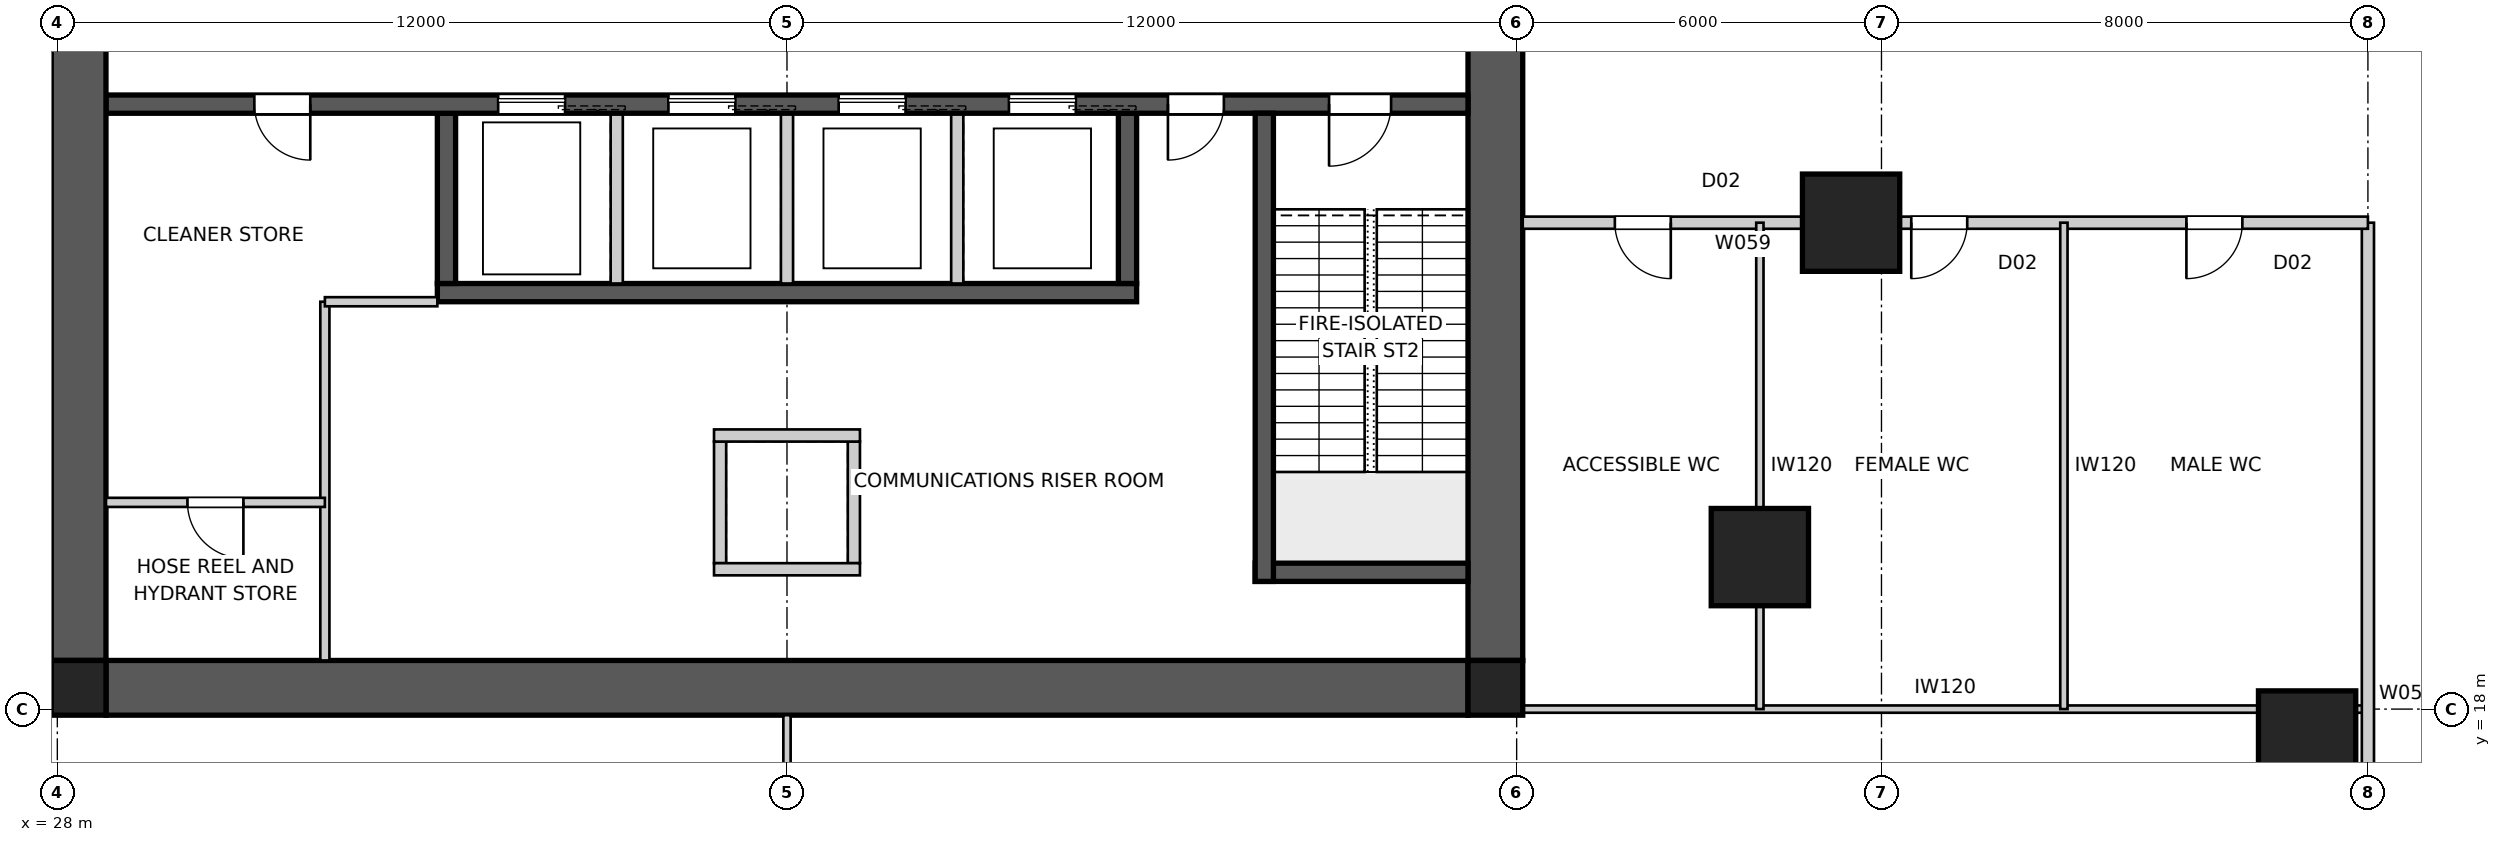
"""IFC4 building model, lengths in metres.
Left out: names, types, materials, properties, quantities, classifications, styles, units other than length and angle.
Written with IfcOpenShell. Run it as: python <this file> out.ifc"""

import sys

from ifc_helpers import new_model, si_unit, direction, frame, frame_2d, origin, origin_2d, place, context, subcontext, project, spatial, polyline, rectangle, outline, extrude, element, fill, save


model = new_model("IFC4")
c1 = context("Model", 3, precision=1e-05, world=origin(), true_north=direction((0.0, 1.0)))
c2 = subcontext(c1, "Body", "Model", "MODEL_VIEW")
j1 = project(units=[si_unit("LENGTHUNIT", "METRE"), si_unit("PLANEANGLEUNIT", "RADIAN")], contexts=[c1])
p1 = place(None, origin())
s1 = spatial("IfcSite", under=j1, at=p1, CompositionType="ELEMENT")
p2 = place(p1, origin())
s2 = spatial("IfcBuilding", under=s1, at=p2, CompositionType="ELEMENT")
p3 = place(p2, origin())
s3 = spatial("IfcBuildingStorey", under=s2, at=p3, CompositionType="ELEMENT", Elevation=0.0)
p4 = place(p3, frame((51.2, 18.35, 0.0), z_axis=(0.0, 0.0, 1.0), x_axis=(-1.0, 0.0, 0.0)))
e1 = element("IfcWall", 1, at=p4, inside=s3, PredefinedType="SHEAR", context=c2, shape_type="SweptSolid", body=[
    extrude(outline(polyline([(0.0, -0.45), (22.4, -0.45), (22.4, -0.025), (22.85, -0.025), (22.85, 0.025), (22.4, 0.025), (22.4, 0.45), (0.0, 0.45), (0.0, 0.025), (-0.45, 0.025), (-0.45, -0.025), (0.0, -0.025), (0.0, -0.45)])), origin(), (0.0, 0.0, 1.0), 6.0),
])
p5 = place(p3, frame((51.65, 18.8, 0.0), z_axis=(0.0, 0.0, 1.0), x_axis=(0.0, 1.0, 0.0)))
e2 = element("IfcWall", 2, at=p5, inside=s3, PredefinedType="SHEAR", context=c2, shape_type="SweptSolid", body=[
    extrude(outline(polyline([(0.0, -0.45), (22.4, -0.45), (22.4, -0.025), (22.85, -0.025), (22.85, 0.025), (22.4, 0.025), (22.4, 0.45), (0.0, 0.45), (0.0, 0.025), (-0.45, 0.025), (-0.45, -0.025), (0.0, -0.025), (0.0, -0.45)])), origin(), (0.0, 0.0, 1.0), 6.0),
])
p6 = place(p5, frame((11.14, 0.0, 0.0)))
e3 = element("IfcOpeningElement", 3, at=p6, cuts=e2, PredefinedType="OPENING", context=c2, shape_type="SweptSolid", body=[
    extrude(rectangle(XDim=1.02, YDim=2.4, at=frame_2d((0.51, 1.2))), frame((0.0, 0.46, 0.0), z_axis=(0.0, -1.0, 0.0), x_axis=(1.0, 0.0, 0.0)), (0.0, 0.0, 1.0), 0.92),
])
p7 = place(p3, frame((28.35, 41.2, 0.0), z_axis=(0.0, 0.0, 1.0), x_axis=(0.0, -1.0, 0.0)))
e4 = element("IfcWall", 4, at=p7, inside=s3, PredefinedType="SHEAR", context=c2, shape_type="SweptSolid", body=[
    extrude(outline(polyline([(0.0, -0.45), (22.4, -0.45), (22.4, -0.025), (22.85, -0.025), (22.85, 0.025), (22.4, 0.025), (22.4, 0.45), (0.0, 0.45), (0.0, 0.025), (-0.45, 0.025), (-0.45, -0.025), (0.0, -0.025), (0.0, -0.45)])), origin(), (0.0, 0.0, 1.0), 6.0),
])
p8 = place(p7, frame((11.14, 0.0, 0.0)))
e5 = element("IfcOpeningElement", 5, at=p8, cuts=e4, PredefinedType="OPENING", context=c2, shape_type="SweptSolid", body=[
    extrude(rectangle(XDim=1.02, YDim=2.4, at=frame_2d((0.51, 1.2))), frame((0.0, 0.46, 0.0), z_axis=(0.0, -1.0, 0.0), x_axis=(1.0, 0.0, 0.0)), (0.0, 0.0, 1.0), 0.92),
])
p9 = place(p3, frame((51.2, 27.95, 0.0), z_axis=(0.0, 0.0, 1.0), x_axis=(-1.0, 0.0, 0.0)))
e6 = element("IfcWall", 6, at=p9, inside=s3, PredefinedType="SHEAR", context=c2, shape_type="SweptSolid", body=[
    extrude(rectangle(XDim=22.4, YDim=0.3, at=frame_2d((11.2, 0.0))), origin(), (0.0, 0.0, 1.0), 6.0),
])
p10 = place(p9, frame((19.04, 0.0, 0.0)))
e7 = element("IfcOpeningElement", 7, at=p10, cuts=e6, PredefinedType="OPENING", context=c2, shape_type="SweptSolid", body=[
    extrude(rectangle(XDim=0.92, YDim=2.1, at=frame_2d((0.46, 1.05))), frame((0.0, 0.16, 0.0), z_axis=(0.0, -1.0, 0.0), x_axis=(1.0, 0.0, 0.0)), (0.0, 0.0, 1.0), 0.32),
])
p11 = place(p9, frame((1.265, 0.0, 0.0)))
e8 = element("IfcOpeningElement", 8, at=p11, cuts=e6, PredefinedType="OPENING", context=c2, shape_type="SweptSolid", body=[
    extrude(rectangle(XDim=1.02, YDim=2.1, at=frame_2d((0.51, 1.05))), frame((0.0, 0.16, 0.0), z_axis=(0.0, -1.0, 0.0), x_axis=(1.0, 0.0, 0.0)), (0.0, 0.0, 1.0), 0.32),
])
p12 = place(p9, frame((4.015, 0.0, 0.0)))
e9 = element("IfcOpeningElement", 9, at=p12, cuts=e6, PredefinedType="OPENING", context=c2, shape_type="SweptSolid", body=[
    extrude(rectangle(XDim=0.92, YDim=2.1, at=frame_2d((0.46, 1.05))), frame((0.0, 0.16, 0.0), z_axis=(0.0, -1.0, 0.0), x_axis=(1.0, 0.0, 0.0)), (0.0, 0.0, 1.0), 0.32),
])
p13 = place(p9, frame((6.45, 0.0, 0.0)))
e10 = element("IfcOpeningElement", 10, at=p13, cuts=e6, PredefinedType="OPENING", context=c2, shape_type="SweptSolid", body=[
    extrude(rectangle(XDim=1.1, YDim=2.1, at=frame_2d((0.55, 1.05))), frame((0.0, 0.16, 0.0), z_axis=(0.0, -1.0, 0.0), x_axis=(1.0, 0.0, 0.0)), (0.0, 0.0, 1.0), 0.32),
])
p14 = place(p9, frame((9.25, 0.0, 0.0)))
e11 = element("IfcOpeningElement", 11, at=p14, cuts=e6, PredefinedType="OPENING", context=c2, shape_type="SweptSolid", body=[
    extrude(rectangle(XDim=1.1, YDim=2.1, at=frame_2d((0.55, 1.05))), frame((0.0, 0.16, 0.0), z_axis=(0.0, -1.0, 0.0), x_axis=(1.0, 0.0, 0.0)), (0.0, 0.0, 1.0), 0.32),
])
p15 = place(p9, frame((12.05, 0.0, 0.0)))
e12 = element("IfcOpeningElement", 12, at=p15, cuts=e6, PredefinedType="OPENING", context=c2, shape_type="SweptSolid", body=[
    extrude(rectangle(XDim=1.1, YDim=2.1, at=frame_2d((0.55, 1.05))), frame((0.0, 0.16, 0.0), z_axis=(0.0, -1.0, 0.0), x_axis=(1.0, 0.0, 0.0)), (0.0, 0.0, 1.0), 0.32),
])
p16 = place(p9, frame((14.85, 0.0, 0.0)))
e13 = element("IfcOpeningElement", 13, at=p16, cuts=e6, PredefinedType="OPENING", context=c2, shape_type="SweptSolid", body=[
    extrude(rectangle(XDim=1.1, YDim=2.1, at=frame_2d((0.55, 1.05))), frame((0.0, 0.16, 0.0), z_axis=(0.0, -1.0, 0.0), x_axis=(1.0, 0.0, 0.0)), (0.0, 0.0, 1.0), 0.32),
])
p17 = place(p3, frame((45.75, 24.85, 0.0), z_axis=(0.0, 0.0, 1.0), x_axis=(-1.0, 0.0, 0.0)))
e14 = element("IfcWall", 14, at=p17, inside=s3, PredefinedType="SHEAR", context=c2, shape_type="SweptSolid", body=[
    extrude(rectangle(XDim=11.5, YDim=0.3, at=frame_2d((5.75, 0.0))), origin(), (0.0, 0.0, 1.0), 6.0),
])
p18 = place(p3, frame((45.6, 27.8, 0.0), z_axis=(0.0, 0.0, 1.0), x_axis=(0.0, -1.0, 0.0)))
e15 = element("IfcWall", 15, at=p18, inside=s3, PredefinedType="SHEAR", context=c2, shape_type="SweptSolid", body=[
    extrude(rectangle(XDim=2.8, YDim=0.3, at=frame_2d((1.4, 0.0))), origin(), (0.0, 0.0, 1.0), 6.0),
])
for number, where, z_axis, x_axis in (
    (16, (42.8, 27.8, 0.0), (0.0, 0.0, 1.0), (0.0, -1.0, 0.0)),
    (17, (40.0, 27.8, 0.0), (0.0, 0.0, 1.0), (0.0, -1.0, 0.0)),
    (18, (37.2, 27.8, 0.0), (0.0, 0.0, 1.0), (0.0, -1.0, 0.0)),
):
    element("IfcWall", number, at=place(p3, frame(where, z_axis=z_axis, x_axis=x_axis)), inside=s3, PredefinedType="SOLIDWALL", context=c2, shape_type="SweptSolid", body=[
        extrude(rectangle(XDim=2.8, YDim=0.2, at=frame_2d((1.4, 0.0))), origin(), (0.0, 0.0, 1.0), 6.0),
    ])
p19 = place(p3, frame((34.4, 27.8, 0.0), z_axis=(0.0, 0.0, 1.0), x_axis=(0.0, -1.0, 0.0)))
e19 = element("IfcWall", 19, at=p19, inside=s3, PredefinedType="SHEAR", context=c2, shape_type="SweptSolid", body=[
    extrude(rectangle(XDim=2.8, YDim=0.3, at=frame_2d((1.4, 0.0))), origin(), (0.0, 0.0, 1.0), 6.0),
])
p20 = place(p3, frame((47.85, 27.8, 0.0), z_axis=(0.0, 0.0, 1.0), x_axis=(0.0, -1.0, 0.0)))
e20 = element("IfcWall", 20, at=p20, inside=s3, PredefinedType="SHEAR", context=c2, shape_type="SweptSolid", body=[
    extrude(rectangle(XDim=7.7, YDim=0.3, at=frame_2d((3.85, 0.0))), origin(), (0.0, 0.0, 1.0), 6.0),
])
p21 = place(p3, frame((51.2, 20.25, 0.0), z_axis=(0.0, 0.0, 1.0), x_axis=(-1.0, 0.0, 0.0)))
e21 = element("IfcWall", 21, at=p21, inside=s3, PredefinedType="SHEAR", context=c2, shape_type="SweptSolid", body=[
    extrude(rectangle(XDim=3.5, YDim=0.3, at=frame_2d((1.75, 0.0))), origin(), (0.0, 0.0, 1.0), 6.0),
])
for number, where, z_axis, x_axis in (
    (22, (38.9, 22.4, 0.0), (0.0, 0.0, 1.0), (0.0, -1.0, 0.0)),
    (23, (41.1, 22.4, 0.0), (0.0, 0.0, 1.0), (0.0, -1.0, 0.0)),
):
    element("IfcWall", number, at=place(p3, frame(where, z_axis=z_axis, x_axis=x_axis)), inside=s3, PredefinedType="SOLIDWALL", context=c2, shape_type="SweptSolid", body=[
        extrude(rectangle(XDim=2.0, YDim=0.2, at=frame_2d((1.0, 0.0))), origin(), (0.0, 0.0, 1.0), 6.0),
    ])
for number, where, z_axis, x_axis in (
    (24, (38.8, 22.5, 0.0), (0.0, 0.0, 1.0), (1.0, 0.0, 0.0)),
    (25, (38.8, 20.3, 0.0), (0.0, 0.0, 1.0), (1.0, 0.0, 0.0)),
):
    element("IfcWall", number, at=place(p3, frame(where, z_axis=z_axis, x_axis=x_axis)), inside=s3, PredefinedType="SOLIDWALL", context=c2, shape_type="SweptSolid", body=[
        extrude(rectangle(XDim=2.4, YDim=0.2, at=frame_2d((1.2, 0.0))), origin(), (0.0, 0.0, 1.0), 6.0),
    ])
for number, where, z_axis, x_axis in (
    (26, (28.35, 18.35, 0.0), (0.0, 0.0, 1.0), (1.0, 0.0, 0.0)),
    (27, (51.65, 18.35, 0.0), (0.0, 0.0, 1.0), (1.0, 0.0, 0.0)),
):
    element("IfcColumn", number, at=place(p3, frame(where, z_axis=z_axis, x_axis=x_axis)), inside=s3, PredefinedType="COLUMN", context=c2, shape_type="SweptSolid", body=[
        extrude(rectangle(XDim=0.9, YDim=0.9, at=origin_2d()), origin(), (0.0, 0.0, 1.0), 6.0),
    ])
for number, where, z_axis, x_axis in (
    (28, (65.0, 17.5, 0.0), (0.0, 0.0, 1.0), (1.0, 0.0, 0.0)),
    (29, (57.5, 26.0, 0.0), (0.0, 0.0, 1.0), (1.0, 0.0, 0.0)),
    (30, (56.0, 20.5, 0.0), (0.0, 0.0, 1.0), (1.0, 0.0, 0.0)),
):
    element("IfcColumn", number, at=place(p3, frame(where, z_axis=z_axis, x_axis=x_axis)), inside=s3, PredefinedType="COLUMN", context=c2, shape_type="SweptSolid", body=[
        extrude(rectangle(XDim=1.6, YDim=1.6, at=origin_2d()), origin(), (0.0, 0.0, 1.0), 6.0),
    ])
p22 = place(p3, frame((32.4, 18.8, 0.0), z_axis=(0.0, 0.0, 1.0), x_axis=(0.0, 1.0, 0.0)))
e31 = element("IfcWall", 31, at=p22, inside=s3, PredefinedType="SOLIDWALL", context=c2, shape_type="SweptSolid", body=[
    extrude(rectangle(XDim=5.9, YDim=0.15, at=frame_2d((2.95, 0.0))), origin(), (0.0, 0.0, 1.0), 5.65),
])
p23 = place(p3, frame((32.4, 24.7, 0.0), z_axis=(0.0, 0.0, 1.0), x_axis=(1.0, 0.0, 0.0)))
e32 = element("IfcWall", 32, at=p23, inside=s3, PredefinedType="SOLIDWALL", context=c2, shape_type="SweptSolid", body=[
    extrude(rectangle(XDim=1.85, YDim=0.15, at=frame_2d((0.925, 0.0))), origin(), (0.0, 0.0, 1.0), 5.65),
])
p24 = place(p3, frame((32.4, 21.4, 0.0), z_axis=(0.0, 0.0, 1.0), x_axis=(-1.0, 0.0, 0.0)))
e33 = element("IfcWall", 33, at=p24, inside=s3, PredefinedType="SOLIDWALL", context=c2, shape_type="SweptSolid", body=[
    extrude(rectangle(XDim=3.6, YDim=0.15, at=frame_2d((1.8, 0.0))), origin(), (0.0, 0.0, 1.0), 5.65),
])
p25 = place(p24, frame((1.34, 0.0, 0.0)))
e34 = element("IfcOpeningElement", 34, at=p25, cuts=e33, PredefinedType="OPENING", context=c2, shape_type="SweptSolid", body=[
    extrude(rectangle(XDim=0.92, YDim=2.1, at=frame_2d((0.46, 1.05))), frame((0.0, 0.085, 0.0), z_axis=(0.0, -1.0, 0.0), x_axis=(1.0, 0.0, 0.0)), (0.0, 0.0, 1.0), 0.17),
])
p26 = place(p3, frame((40.0, 17.9, 0.0), z_axis=(0.0, 0.0, 1.0), x_axis=(0.0, -1.0, 0.0)))
e35 = element("IfcWall", 35, at=p26, inside=s3, PredefinedType="PARTITIONING", context=c2, shape_type="SweptSolid", body=[
    extrude(rectangle(XDim=14.9, YDim=0.12, at=frame_2d((7.45, 0.0))), origin(), (0.0, 0.0, 1.0), 5.65),
])
p27 = place(p3, frame((52.1, 18.0, 0.0), z_axis=(0.0, 0.0, 1.0), x_axis=(1.0, 0.0, 0.0)))
e36 = element("IfcWall", 36, at=p27, inside=s3, PredefinedType="PARTITIONING", context=c2, shape_type="SweptSolid", body=[
    extrude(rectangle(XDim=13.9, YDim=0.12, at=frame_2d((6.95, 0.0))), origin(), (0.0, 0.0, 1.0), 5.65),
])
p28 = place(p3, frame((66.0, 26.0, 0.0), z_axis=(0.0, 0.0, 1.0), x_axis=(0.0, -1.0, 0.0)))
e37 = element("IfcWall", 37, at=p28, inside=s3, PredefinedType="PARTITIONING", context=c2, shape_type="SweptSolid", body=[
    extrude(rectangle(XDim=23.0, YDim=0.2, at=frame_2d((11.5, 0.0))), origin(), (0.0, 0.0, 1.0), 5.65),
])
p29 = place(p28, frame((15.49, 0.0, 0.0)))
e38 = element("IfcOpeningElement", 38, at=p29, cuts=e37, PredefinedType="OPENING", context=c2, shape_type="SweptSolid", body=[
    extrude(rectangle(XDim=0.92, YDim=2.34, at=frame_2d((0.46, 1.17))), frame((0.0, 0.11, 0.0), z_axis=(0.0, -1.0, 0.0), x_axis=(1.0, 0.0, 0.0)), (0.0, 0.0, 1.0), 0.22),
])
p30 = place(p3, frame((66.0, 26.0, 0.0), z_axis=(0.0, 0.0, 1.0), x_axis=(-1.0, 0.0, 0.0)))
e39 = element("IfcWall", 39, at=p30, inside=s3, PredefinedType="PARTITIONING", context=c2, shape_type="SweptSolid", body=[
    extrude(rectangle(XDim=13.9, YDim=0.2, at=frame_2d((6.95, 0.0))), origin(), (0.0, 0.0, 1.0), 5.65),
])
p31 = place(p30, frame((6.59, 0.0, 0.0)))
e40 = element("IfcOpeningElement", 40, at=p31, cuts=e39, PredefinedType="OPENING", context=c2, shape_type="SweptSolid", body=[
    extrude(rectangle(XDim=0.92, YDim=2.34, at=frame_2d((0.46, 1.17))), frame((0.0, 0.11, 0.0), z_axis=(0.0, -1.0, 0.0), x_axis=(1.0, 0.0, 0.0)), (0.0, 0.0, 1.0), 0.22),
])
p32 = place(p30, frame((2.065, 0.0, 0.0)))
e41 = element("IfcOpeningElement", 41, at=p32, cuts=e39, PredefinedType="OPENING", context=c2, shape_type="SweptSolid", body=[
    extrude(rectangle(XDim=0.92, YDim=2.34, at=frame_2d((0.46, 1.17))), frame((0.0, 0.11, 0.0), z_axis=(0.0, -1.0, 0.0), x_axis=(1.0, 0.0, 0.0)), (0.0, 0.0, 1.0), 0.22),
])
p33 = place(p30, frame((11.465, 0.0, 0.0)))
e42 = element("IfcOpeningElement", 42, at=p33, cuts=e39, PredefinedType="OPENING", context=c2, shape_type="SweptSolid", body=[
    extrude(rectangle(XDim=0.92, YDim=2.34, at=frame_2d((0.46, 1.17))), frame((0.0, 0.11, 0.0), z_axis=(0.0, -1.0, 0.0), x_axis=(1.0, 0.0, 0.0)), (0.0, 0.0, 1.0), 0.22),
])
for number, where, z_axis, x_axis in (
    (43, (56.0, 26.0, 0.0), (0.0, 0.0, 1.0), (0.0, -1.0, 0.0)),
    (44, (61.0, 26.0, 0.0), (0.0, 0.0, 1.0), (0.0, -1.0, 0.0)),
):
    element("IfcWall", number, at=place(p3, frame(where, z_axis=z_axis, x_axis=x_axis)), inside=s3, PredefinedType="PARTITIONING", context=c2, shape_type="SweptSolid", body=[
        extrude(rectangle(XDim=8.0, YDim=0.12, at=frame_2d((4.0, 0.0))), origin(), (0.0, 0.0, 1.0), 5.65),
    ])
p34 = place(p10, origin())
e45 = element("IfcDoor", 45, at=p34, inside=s3, OperationType="SINGLE_SWING_LEFT", PredefinedType="DOOR", context=c2, shape_type="SweptSolid", body=[
    extrude(rectangle(XDim=0.92, YDim=2.1, at=frame_2d((0.46, 1.05))), frame((0.0, 0.025, 0.0), z_axis=(0.0, -1.0, 0.0), x_axis=(1.0, 0.0, 0.0)), (0.0, 0.0, 1.0), 0.05),
])
fill(e7, e45)
p35 = place(p11, origin())
e46 = element("IfcDoor", 46, at=p35, inside=s3, OperationType="SINGLE_SWING_RIGHT", PredefinedType="DOOR", context=c2, shape_type="SweptSolid", body=[
    extrude(rectangle(XDim=1.02, YDim=2.1, at=frame_2d((0.51, 1.05))), frame((0.0, 0.025, 0.0), z_axis=(0.0, -1.0, 0.0), x_axis=(1.0, 0.0, 0.0)), (0.0, 0.0, 1.0), 0.05),
])
fill(e8, e46)
p36 = place(p12, origin())
e47 = element("IfcDoor", 47, at=p36, inside=s3, OperationType="SINGLE_SWING_RIGHT", PredefinedType="DOOR", context=c2, shape_type="SweptSolid", body=[
    extrude(rectangle(XDim=0.92, YDim=2.1, at=frame_2d((0.46, 1.05))), frame((0.0, 0.025, 0.0), z_axis=(0.0, -1.0, 0.0), x_axis=(1.0, 0.0, 0.0)), (0.0, 0.0, 1.0), 0.05),
])
fill(e9, e47)
p37 = place(p31, origin())
e48 = element("IfcDoor", 48, at=p37, inside=s3, OperationType="SINGLE_SWING_RIGHT", PredefinedType="DOOR", context=c2, shape_type="SweptSolid", body=[
    extrude(rectangle(XDim=0.92, YDim=2.34, at=frame_2d((0.46, 1.17))), frame((0.0, 0.025, 0.0), z_axis=(0.0, -1.0, 0.0), x_axis=(1.0, 0.0, 0.0)), (0.0, 0.0, 1.0), 0.05),
])
fill(e40, e48)
p38 = place(p32, origin())
e49 = element("IfcDoor", 49, at=p38, inside=s3, OperationType="SINGLE_SWING_RIGHT", PredefinedType="DOOR", context=c2, shape_type="SweptSolid", body=[
    extrude(rectangle(XDim=0.92, YDim=2.34, at=frame_2d((0.46, 1.17))), frame((0.0, 0.025, 0.0), z_axis=(0.0, -1.0, 0.0), x_axis=(1.0, 0.0, 0.0)), (0.0, 0.0, 1.0), 0.05),
])
fill(e41, e49)
p39 = place(p33, origin())
e50 = element("IfcDoor", 50, at=p39, inside=s3, OperationType="SINGLE_SWING_LEFT", PredefinedType="DOOR", context=c2, shape_type="SweptSolid", body=[
    extrude(rectangle(XDim=0.92, YDim=2.34, at=frame_2d((0.46, 1.17))), frame((0.0, 0.025, 0.0), z_axis=(0.0, -1.0, 0.0), x_axis=(1.0, 0.0, 0.0)), (0.0, 0.0, 1.0), 0.05),
])
fill(e42, e50)
p40 = place(p25, origin())
e51 = element("IfcDoor", 51, at=p40, inside=s3, OperationType="SINGLE_SWING_LEFT", PredefinedType="DOOR", context=c2, shape_type="SweptSolid", body=[
    extrude(rectangle(XDim=0.92, YDim=2.1, at=frame_2d((0.46, 1.05))), frame((0.0, 0.025, 0.0), z_axis=(0.0, -1.0, 0.0), x_axis=(1.0, 0.0, 0.0)), (0.0, 0.0, 1.0), 0.05),
])
fill(e34, e51)
p41 = place(p13, origin())
e52 = element("IfcDoor", 52, at=p41, inside=s3, OperationType="SLIDING_TO_LEFT", PredefinedType="DOOR", context=c2, shape_type="SweptSolid", body=[
    extrude(rectangle(XDim=1.1, YDim=2.1, at=frame_2d((0.55, 1.05))), frame((0.0, 0.025, 0.0), z_axis=(0.0, -1.0, 0.0), x_axis=(1.0, 0.0, 0.0)), (0.0, 0.0, 1.0), 0.05),
])
fill(e10, e52)
p42 = place(p14, origin())
e53 = element("IfcDoor", 53, at=p42, inside=s3, OperationType="SLIDING_TO_LEFT", PredefinedType="DOOR", context=c2, shape_type="SweptSolid", body=[
    extrude(rectangle(XDim=1.1, YDim=2.1, at=frame_2d((0.55, 1.05))), frame((0.0, 0.025, 0.0), z_axis=(0.0, -1.0, 0.0), x_axis=(1.0, 0.0, 0.0)), (0.0, 0.0, 1.0), 0.05),
])
fill(e11, e53)
p43 = place(p15, origin())
e54 = element("IfcDoor", 54, at=p43, inside=s3, OperationType="SLIDING_TO_LEFT", PredefinedType="DOOR", context=c2, shape_type="SweptSolid", body=[
    extrude(rectangle(XDim=1.1, YDim=2.1, at=frame_2d((0.55, 1.05))), frame((0.0, 0.025, 0.0), z_axis=(0.0, -1.0, 0.0), x_axis=(1.0, 0.0, 0.0)), (0.0, 0.0, 1.0), 0.05),
])
fill(e12, e54)
p44 = place(p16, origin())
e55 = element("IfcDoor", 55, at=p44, inside=s3, OperationType="SLIDING_TO_LEFT", PredefinedType="DOOR", context=c2, shape_type="SweptSolid", body=[
    extrude(rectangle(XDim=1.1, YDim=2.1, at=frame_2d((0.55, 1.05))), frame((0.0, 0.025, 0.0), z_axis=(0.0, -1.0, 0.0), x_axis=(1.0, 0.0, 0.0)), (0.0, 0.0, 1.0), 0.05),
])
fill(e13, e55)
save(model, sys.argv[1])
